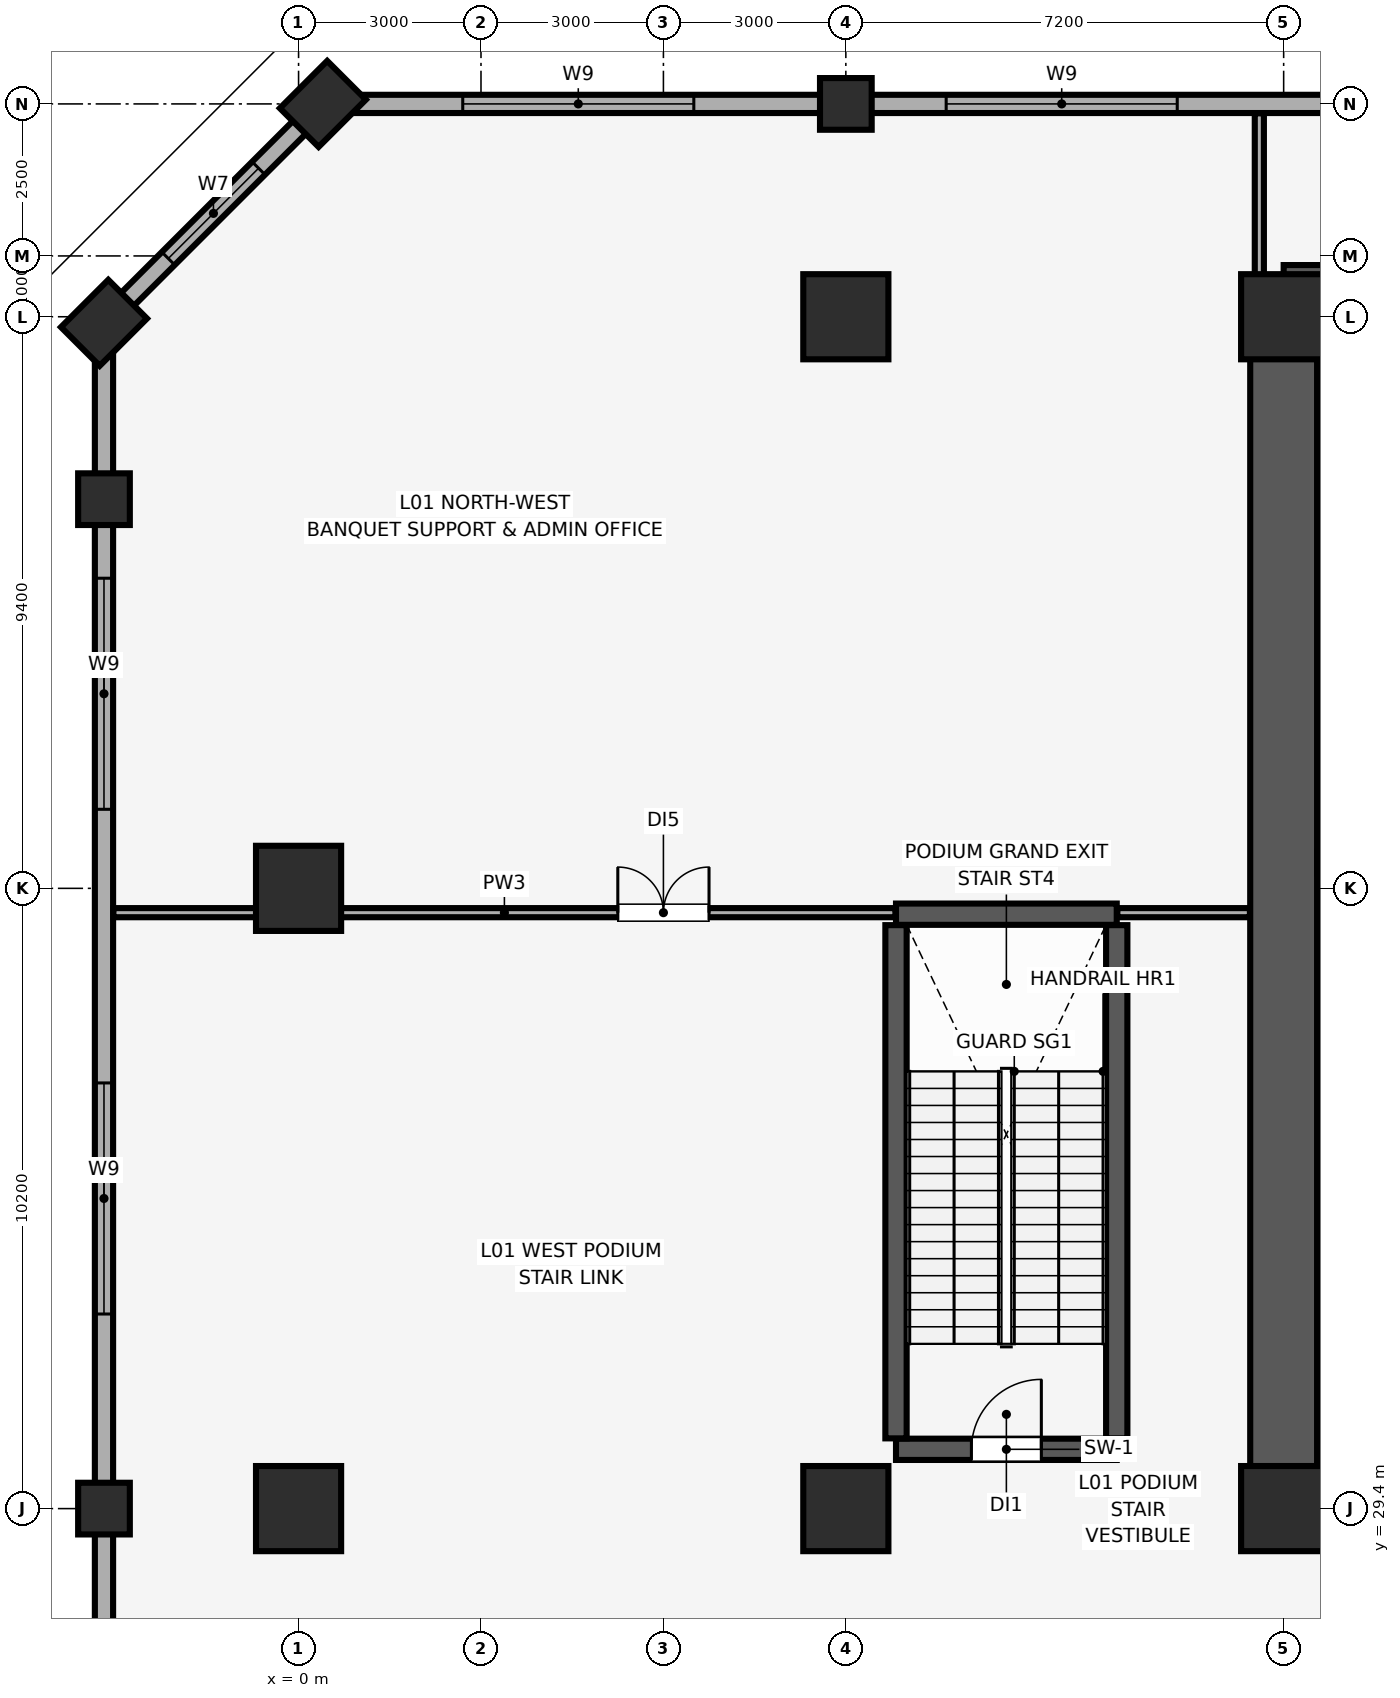
"""IFC4 building model, lengths in metres.
Left out: names, types, materials, properties, quantities, classifications, styles, units other than length and angle.
Written with IfcOpenShell. Run it as: python <this file> out.ifc"""

import sys

from ifc_helpers import new_model, si_unit, direction, frame, frame_2d, origin, origin_2d, place, context, subcontext, project, spatial, rectangle, extrude, element, fill, save


model = new_model("IFC4")
c1 = context("Model", 3, precision=1e-05, world=origin(), true_north=direction((0.0, 1.0)))
c2 = subcontext(c1, "Body", "Model", "MODEL_VIEW")
j1 = project(units=[si_unit("LENGTHUNIT", "METRE"), si_unit("PLANEANGLEUNIT", "RADIAN")], contexts=[c1])
p1 = place(None, origin())
s1 = spatial("IfcSite", under=j1, at=p1, CompositionType="ELEMENT")
p2 = place(p1, origin())
s2 = spatial("IfcBuilding", under=s1, at=p2, CompositionType="ELEMENT")
p3 = place(p2, frame((0.0, 0.0, 8.0)))
s3 = spatial("IfcBuildingStorey", under=s2, at=p3, CompositionType="ELEMENT", Elevation=8.0)
for number, where, z_axis, x_axis in (
    (1, (9.0, 52.5, 0.0), (0.0, 0.0, 1.0), (1.0, 0.0, 0.0)),
    (2, (-3.2, 29.4, 0.0), (0.0, 0.0, 1.0), (1.0, 0.0, 0.0)),
    (3, (-3.2, 46.0, 0.0), (0.0, 0.0, 1.0), (1.0, 0.0, 0.0)),
):
    element("IfcColumn", number, at=place(p3, frame(where, z_axis=z_axis, x_axis=x_axis)), inside=s3, PredefinedType="COLUMN", context=c2, shape_type="SweptSolid", body=[
        extrude(rectangle(XDim=0.85, YDim=0.85, at=origin_2d()), origin(), (0.0, 0.0, 1.0), 5.68),
    ])
for number, where, z_axis, x_axis in (
    (4, (0.4, 52.5, 0.0), (0.0, 0.0, 1.0), (0.707, 0.707, 0.0)),
    (5, (-3.2, 48.9, 0.0), (0.0, 0.0, 1.0), (0.707, 0.707, 0.0)),
):
    element("IfcColumn", number, at=place(p3, frame(where, z_axis=z_axis, x_axis=x_axis)), inside=s3, PredefinedType="PILASTER", context=c2, shape_type="SweptSolid", body=[
        extrude(rectangle(XDim=1.1, YDim=0.9, at=origin_2d()), origin(), (0.0, 0.0, 1.0), 5.68),
    ])
for number, where, z_axis, x_axis in (
    (6, (9.0, 29.4, 0.0), (0.0, 0.0, 1.0), (1.0, 0.0, 0.0)),
    (7, (9.0, 49.0, 0.0), (0.0, 0.0, 1.0), (1.0, 0.0, 0.0)),
    (8, (16.2, 29.4, 0.0), (0.0, 0.0, 1.0), (1.0, 0.0, 0.0)),
    (9, (16.2, 49.0, 0.0), (0.0, 0.0, 1.0), (1.0, 0.0, 0.0)),
    (10, (0.0, 29.4, 0.0), (0.0, 0.0, 1.0), (1.0, 0.0, 0.0)),
    (11, (0.0, 39.6, 0.0), (0.0, 0.0, 1.0), (1.0, 0.0, 0.0)),
):
    element("IfcColumn", number, at=place(p3, frame(where, z_axis=z_axis, x_axis=x_axis)), inside=s3, PredefinedType="COLUMN", context=c2, shape_type="SweptSolid", body=[
        extrude(rectangle(XDim=1.4, YDim=1.4, at=origin_2d()), origin(), (0.0, 0.0, 1.0), 5.68),
    ])
p4 = place(p3, frame((83.6, 52.5, 0.0), z_axis=(0.0, 0.0, 1.0), x_axis=(-1.0, 0.0, 0.0)))
e12 = element("IfcWall", 12, at=p4, inside=s3, PredefinedType="SOLIDWALL", context=c2, shape_type="SweptSolid", body=[
    extrude(rectangle(XDim=83.2, YDim=0.3, at=frame_2d((41.6, 0.0))), origin(), (0.0, 0.0, 1.0), 4.73),
])
p5 = place(p4, frame((77.1, 0.0, 0.85)))
e13 = element("IfcOpeningElement", 13, at=p5, cuts=e12, PredefinedType="OPENING", context=c2, shape_type="SweptSolid", body=[
    extrude(rectangle(XDim=3.8, YDim=2.2, at=frame_2d((1.9, 1.1))), frame((0.0, 0.16, 0.0), z_axis=(0.0, -1.0, 0.0), x_axis=(1.0, 0.0, 0.0)), (0.0, 0.0, 1.0), 0.32),
])
p6 = place(p4, frame((69.15, 0.0, 0.85)))
e14 = element("IfcOpeningElement", 14, at=p6, cuts=e12, PredefinedType="OPENING", context=c2, shape_type="SweptSolid", body=[
    extrude(rectangle(XDim=3.8, YDim=2.2, at=frame_2d((1.9, 1.1))), frame((0.0, 0.16, 0.0), z_axis=(0.0, -1.0, 0.0), x_axis=(1.0, 0.0, 0.0)), (0.0, 0.0, 1.0), 0.32),
])
p7 = place(p4, frame((10.1, 0.0, 0.85)))
e15 = element("IfcOpeningElement", 15, at=p7, cuts=e12, PredefinedType="OPENING", context=c2, shape_type="SweptSolid", body=[
    extrude(rectangle(XDim=3.8, YDim=2.2, at=frame_2d((1.9, 1.1))), frame((0.0, 0.16, 0.0), z_axis=(0.0, -1.0, 0.0), x_axis=(1.0, 0.0, 0.0)), (0.0, 0.0, 1.0), 0.32),
])
p8 = place(p4, frame((2.3, 0.0, 0.85)))
e16 = element("IfcOpeningElement", 16, at=p8, cuts=e12, PredefinedType="OPENING", context=c2, shape_type="SweptSolid", body=[
    extrude(rectangle(XDim=3.8, YDim=2.2, at=frame_2d((1.9, 1.1))), frame((0.0, 0.16, 0.0), z_axis=(0.0, -1.0, 0.0), x_axis=(1.0, 0.0, 0.0)), (0.0, 0.0, 1.0), 0.32),
])
p9 = place(p3, frame((0.4, 52.5, 0.0), z_axis=(0.0, 0.0, 1.0), x_axis=(-0.707082803744, -0.707130757816, 0.0)))
e17 = element("IfcWall", 17, at=p9, inside=s3, PredefinedType="SOLIDWALL", context=c2, shape_type="SweptSolid", body=[
    extrude(rectangle(XDim=5.091, YDim=0.3, at=frame_2d((2.545, 0.0))), origin(), (0.0, 0.0, 1.0), 4.73),
])
p10 = place(p9, frame((1.496, 0.0, 0.85)))
e18 = element("IfcOpeningElement", 18, at=p10, cuts=e17, PredefinedType="OPENING", context=c2, shape_type="SweptSolid", body=[
    extrude(rectangle(XDim=2.1, YDim=1.6, at=frame_2d((1.05, 0.8))), frame((0.0, 0.16, 0.0), z_axis=(0.0, -1.0, 0.0), x_axis=(1.0, 0.0, 0.0)), (0.0, 0.0, 1.0), 0.32),
])
p11 = place(p3, frame((-3.2, 48.9, 0.0), z_axis=(0.0, 0.0, 1.0), x_axis=(0.0, -1.0, 0.0)))
e19 = element("IfcWall", 19, at=p11, inside=s3, PredefinedType="SOLIDWALL", context=c2, shape_type="SweptSolid", body=[
    extrude(rectangle(XDim=23.505, YDim=0.3, at=frame_2d((11.752, 0.0))), origin(), (0.0, 0.0, 1.0), 4.73),
])
p12 = place(p11, frame((12.5, 0.0, 0.85)))
e20 = element("IfcOpeningElement", 20, at=p12, cuts=e19, PredefinedType="OPENING", context=c2, shape_type="SweptSolid", body=[
    extrude(rectangle(XDim=3.8, YDim=2.2, at=frame_2d((1.9, 1.1))), frame((0.0, 0.16, 0.0), z_axis=(0.0, -1.0, 0.0), x_axis=(1.0, 0.0, 0.0)), (0.0, 0.0, 1.0), 0.32),
])
p13 = place(p11, frame((4.2, 0.0, 0.85)))
e21 = element("IfcOpeningElement", 21, at=p13, cuts=e19, PredefinedType="OPENING", context=c2, shape_type="SweptSolid", body=[
    extrude(rectangle(XDim=3.8, YDim=2.2, at=frame_2d((1.9, 1.1))), frame((0.0, 0.16, 0.0), z_axis=(0.0, -1.0, 0.0), x_axis=(1.0, 0.0, 0.0)), (0.0, 0.0, 1.0), 0.32),
])
p14 = place(p3, frame((16.2, 49.3, 0.0), z_axis=(0.0, 0.0, 1.0), x_axis=(1.0, 0.0, 0.0)))
e22 = element("IfcWall", 22, at=p14, inside=s3, PredefinedType="SHEAR", context=c2, shape_type="SweptSolid", body=[
    extrude(rectangle(XDim=51.6, YDim=1.1, at=frame_2d((25.8, 0.0))), origin(), (0.0, 0.0, 1.0), 5.68),
])
p15 = place(p3, frame((16.2, 29.4, 0.0), z_axis=(0.0, 0.0, 1.0), x_axis=(0.0, 1.0, 0.0)))
e23 = element("IfcWall", 23, at=p15, inside=s3, PredefinedType="SHEAR", context=c2, shape_type="SweptSolid", body=[
    extrude(rectangle(XDim=19.2, YDim=1.1, at=frame_2d((9.6, 0.0))), origin(), (0.0, 0.0, 1.0), 5.68),
])
p16 = place(p3, frame((16.755, 29.4, 0.0), z_axis=(0.0, 0.0, 1.0), x_axis=(1.0, 0.0, 0.0)))
e24 = element("IfcWall", 24, at=p16, inside=s3, PredefinedType="SHEAR", context=c2, shape_type="SweptSolid", body=[
    extrude(rectangle(XDim=6.845, YDim=1.1, at=frame_2d((3.423, 0.0))), origin(), (0.0, 0.0, 1.0), 5.68),
])
p17 = place(p3, frame((16.755, 40.025, 0.0), z_axis=(0.0, 0.0, 1.0), x_axis=(1.0, 0.0, 0.0)))
e25 = element("IfcWall", 25, at=p17, inside=s3, PredefinedType="SHEAR", context=c2, shape_type="SweptSolid", body=[
    extrude(rectangle(XDim=4.1, YDim=0.35, at=frame_2d((2.05, 0.0))), origin(), (0.0, 0.0, 1.0), 5.68),
])
p18 = place(p17, frame((1.71, 0.0, 0.0)))
e26 = element("IfcOpeningElement", 26, at=p18, cuts=e25, PredefinedType="OPENING", context=c2, shape_type="SweptSolid", body=[
    extrude(rectangle(XDim=1.15, YDim=2.15, at=frame_2d((0.575, 1.075))), frame((0.0, 0.185, 0.0), z_axis=(0.0, -1.0, 0.0), x_axis=(1.0, 0.0, 0.0)), (0.0, 0.0, 1.0), 0.37),
])
p19 = place(p3, frame((9.825, 30.375, 0.0), z_axis=(0.0, 0.0, 1.0), x_axis=(1.0, 0.0, 0.0)))
e27 = element("IfcWall", 27, at=p19, inside=s3, PredefinedType="SHEAR", context=c2, shape_type="SweptSolid", body=[
    extrude(rectangle(XDim=3.63, YDim=0.35, at=frame_2d((1.815, 0.0))), origin(), (0.0, 0.0, 1.0), 5.68),
])
p20 = place(p19, frame((1.24, 0.0, 0.0)))
e28 = element("IfcOpeningElement", 28, at=p20, cuts=e27, PredefinedType="OPENING", context=c2, shape_type="SweptSolid", body=[
    extrude(rectangle(XDim=1.15, YDim=2.15, at=frame_2d((0.575, 1.075))), frame((0.0, 0.185, 0.0), z_axis=(0.0, -1.0, 0.0), x_axis=(1.0, 0.0, 0.0)), (0.0, 0.0, 1.0), 0.37),
])
p21 = place(p3, frame((9.825, 39.175, 0.0), z_axis=(0.0, 0.0, 1.0), x_axis=(1.0, 0.0, 0.0)))
e29 = element("IfcWall", 29, at=p21, inside=s3, PredefinedType="SHEAR", context=c2, shape_type="SweptSolid", body=[
    extrude(rectangle(XDim=3.63, YDim=0.35, at=frame_2d((1.815, 0.0))), origin(), (0.0, 0.0, 1.0), 5.68),
])
for number, where, z_axis, x_axis in (
    (30, (9.825, 30.555, 0.0), (0.0, 0.0, 1.0), (0.0, 1.0, 0.0)),
    (31, (13.455, 30.555, 0.0), (0.0, 0.0, 1.0), (0.0, 1.0, 0.0)),
):
    element("IfcWall", number, at=place(p3, frame(where, z_axis=z_axis, x_axis=x_axis)), inside=s3, PredefinedType="SHEAR", context=c2, shape_type="SweptSolid", body=[
        extrude(rectangle(XDim=8.44, YDim=0.35, at=frame_2d((4.22, 0.0))), origin(), (0.0, 0.0, 1.0), 5.68),
    ])
p22 = place(p3, frame((-3.045, 39.2, 0.0), z_axis=(0.0, 0.0, 1.0), x_axis=(1.0, 0.0, 0.0)))
e32 = element("IfcWall", 32, at=p22, inside=s3, PredefinedType="PARTITIONING", context=c2, shape_type="SweptSolid", body=[
    extrude(rectangle(XDim=12.86, YDim=0.15, at=frame_2d((6.43, 0.0))), origin(), (0.0, 0.0, 1.0), 5.68),
])
p23 = place(p22, frame((8.295, 0.0, 0.0)))
e33 = element("IfcOpeningElement", 33, at=p23, cuts=e32, PredefinedType="OPENING", context=c2, shape_type="SweptSolid", body=[
    extrude(rectangle(XDim=1.5, YDim=2.25, at=frame_2d((0.75, 1.125))), frame((0.0, 0.085, 0.0), z_axis=(0.0, -1.0, 0.0), x_axis=(1.0, 0.0, 0.0)), (0.0, 0.0, 1.0), 0.17),
])
p24 = place(p3, frame((13.465, 39.2, 0.0), z_axis=(0.0, 0.0, 1.0), x_axis=(1.0, 0.0, 0.0)))
e34 = element("IfcWall", 34, at=p24, inside=s3, PredefinedType="PARTITIONING", context=c2, shape_type="SweptSolid", body=[
    extrude(rectangle(XDim=2.18, YDim=0.15, at=frame_2d((1.09, 0.0))), origin(), (0.0, 0.0, 1.0), 5.68),
])
p25 = place(p3, frame((15.8, 48.61, 0.0), z_axis=(0.0, 0.0, 1.0), x_axis=(0.0, 1.0, 0.0)))
e35 = element("IfcWall", 35, at=p25, inside=s3, PredefinedType="PARTITIONING", context=c2, shape_type="SweptSolid", body=[
    extrude(rectangle(XDim=3.735, YDim=0.15, at=frame_2d((1.867, 0.0))), origin(), (0.0, 0.0, 1.0), 5.68),
])
p26 = place(p10, origin())
e36 = element("IfcWindow", 36, at=p26, inside=s3, PartitioningType="SINGLE_PANEL", PredefinedType="WINDOW", context=c2, shape_type="SweptSolid", body=[
    extrude(rectangle(XDim=2.1, YDim=1.6, at=frame_2d((1.05, 0.8))), frame((0.0, 0.03, 0.0), z_axis=(0.0, -1.0, 0.0), x_axis=(1.0, 0.0, 0.0)), (0.0, 0.0, 1.0), 0.06),
])
fill(e18, e36)
p27 = place(p12, origin())
e37 = element("IfcWindow", 37, at=p27, inside=s3, PartitioningType="SINGLE_PANEL", PredefinedType="WINDOW", context=c2, shape_type="SweptSolid", body=[
    extrude(rectangle(XDim=3.8, YDim=2.2, at=frame_2d((1.9, 1.1))), frame((0.0, 0.03, 0.0), z_axis=(0.0, -1.0, 0.0), x_axis=(1.0, 0.0, 0.0)), (0.0, 0.0, 1.0), 0.06),
])
fill(e20, e37)
p28 = place(p13, origin())
e38 = element("IfcWindow", 38, at=p28, inside=s3, PartitioningType="SINGLE_PANEL", PredefinedType="WINDOW", context=c2, shape_type="SweptSolid", body=[
    extrude(rectangle(XDim=3.8, YDim=2.2, at=frame_2d((1.9, 1.1))), frame((0.0, 0.03, 0.0), z_axis=(0.0, -1.0, 0.0), x_axis=(1.0, 0.0, 0.0)), (0.0, 0.0, 1.0), 0.06),
])
fill(e21, e38)
p29 = place(p5, origin())
e39 = element("IfcWindow", 39, at=p29, inside=s3, PartitioningType="SINGLE_PANEL", PredefinedType="WINDOW", context=c2, shape_type="SweptSolid", body=[
    extrude(rectangle(XDim=3.8, YDim=2.2, at=frame_2d((1.9, 1.1))), frame((0.0, 0.03, 0.0), z_axis=(0.0, -1.0, 0.0), x_axis=(1.0, 0.0, 0.0)), (0.0, 0.0, 1.0), 0.06),
])
fill(e13, e39)
p30 = place(p6, origin())
e40 = element("IfcWindow", 40, at=p30, inside=s3, PartitioningType="SINGLE_PANEL", PredefinedType="WINDOW", context=c2, shape_type="SweptSolid", body=[
    extrude(rectangle(XDim=3.8, YDim=2.2, at=frame_2d((1.9, 1.1))), frame((0.0, 0.03, 0.0), z_axis=(0.0, -1.0, 0.0), x_axis=(1.0, 0.0, 0.0)), (0.0, 0.0, 1.0), 0.06),
])
fill(e14, e40)
p31 = place(p20, origin())
e41 = element("IfcDoor", 41, at=p31, inside=s3, OperationType="SINGLE_SWING_RIGHT", PredefinedType="DOOR", context=c2, shape_type="SweptSolid", body=[
    extrude(rectangle(XDim=1.15, YDim=2.15, at=frame_2d((0.575, 1.075))), frame((0.0, 0.025, 0.0), z_axis=(0.0, -1.0, 0.0), x_axis=(1.0, 0.0, 0.0)), (0.0, 0.0, 1.0), 0.05),
])
fill(e28, e41)
p32 = place(p23, origin())
e42 = element("IfcDoor", 42, at=p32, inside=s3, OperationType="DOUBLE_DOOR_SINGLE_SWING", PredefinedType="DOOR", context=c2, shape_type="SweptSolid", body=[
    extrude(rectangle(XDim=1.5, YDim=2.25, at=frame_2d((0.75, 1.125))), frame((0.0, 0.025, 0.0), z_axis=(0.0, -1.0, 0.0), x_axis=(1.0, 0.0, 0.0)), (0.0, 0.0, 1.0), 0.05),
])
fill(e33, e42)
save(model, sys.argv[1])
